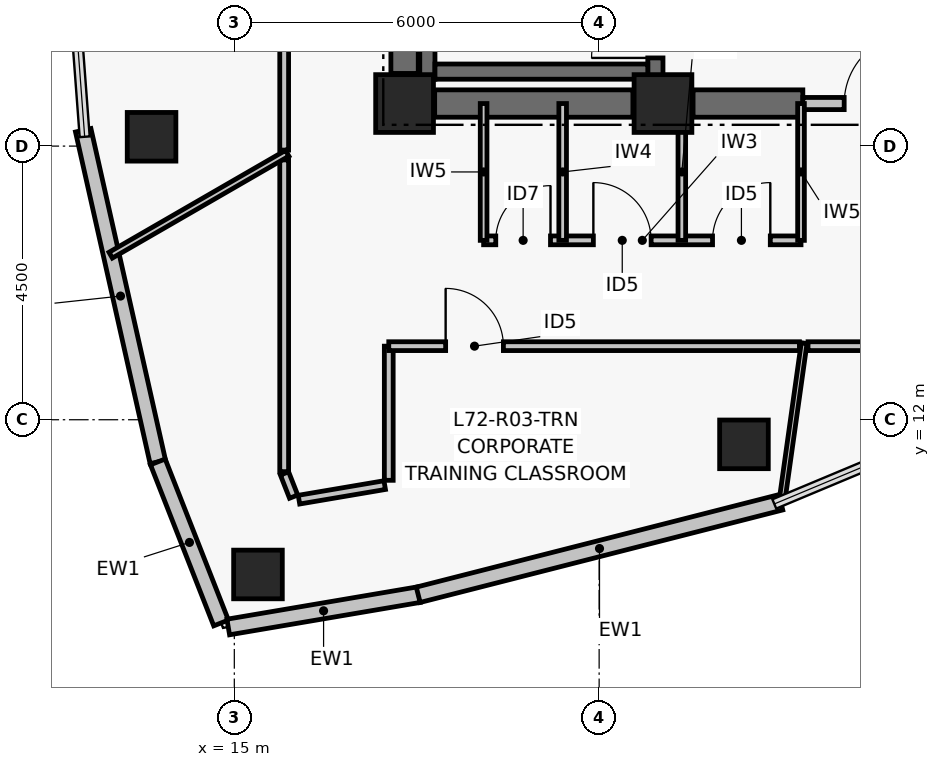
"""IFC4 building model, lengths in metres.
Left out: names, types, materials, properties, quantities, classifications, styles, units other than length and angle.
Written with IfcOpenShell. Run it as: python <this file> out.ifc"""

import sys

from ifc_helpers import new_model, si_unit, direction, frame, frame_2d, origin, origin_2d, place, context, subcontext, project, spatial, rectangle, hollow_rectangle, extrude, element, fill, save


model = new_model("IFC4")
c1 = context("Model", 3, precision=1e-05, world=origin(), true_north=direction((0.0, 1.0)))
c2 = subcontext(c1, "Body", "Model", "MODEL_VIEW")
j1 = project(units=[si_unit("LENGTHUNIT", "METRE"), si_unit("PLANEANGLEUNIT", "RADIAN")], contexts=[c1])
p1 = place(None, origin())
s1 = spatial("IfcSite", under=j1, at=p1, CompositionType="ELEMENT")
p2 = place(p1, origin())
s2 = spatial("IfcBuilding", under=s1, at=p2, CompositionType="ELEMENT")
p3 = place(p2, frame((0.0, 0.0, 284.34)))
s3 = spatial("IfcBuildingStorey", under=s2, at=p3, CompositionType="ELEMENT", Elevation=284.34)
for number, where, z_axis, x_axis in (
    (1, (17.8, 17.2, 0.0), (0.0, 0.0, 1.0), (1.0, 0.0, 0.0)),
    (2, (22.05, 17.2, 0.0), (0.0, 0.0, 1.0), (1.0, 0.0, 0.0)),
):
    element("IfcColumn", number, at=place(p3, frame(where, z_axis=z_axis, x_axis=x_axis)), inside=s3, PredefinedType="COLUMN", context=c2, shape_type="SweptSolid", body=[
        extrude(rectangle(XDim=0.95, YDim=0.95, at=origin_2d()), origin(), (0.0, 0.0, 1.0), 3.72),
    ])
p4 = place(p3, frame((18.295, 17.2, 0.0), z_axis=(0.0, 0.0, 1.0), x_axis=(1.0, 0.0, 0.0)))
e3 = element("IfcWall", 3, at=p4, inside=s3, PredefinedType="SHEAR", context=c2, shape_type="SweptSolid", body=[
    extrude(rectangle(XDim=3.26, YDim=0.45, at=frame_2d((1.63, 0.0))), origin(), (0.0, 0.0, 1.0), 3.5),
])
p5 = place(p3, frame((22.545, 17.2, 0.0), z_axis=(0.0, 0.0, 1.0), x_axis=(1.0, 0.0, 0.0)))
e4 = element("IfcWall", 4, at=p5, inside=s3, PredefinedType="SHEAR", context=c2, shape_type="SweptSolid", body=[
    extrude(rectangle(XDim=1.805, YDim=0.45, at=frame_2d((0.903, 0.0))), origin(), (0.0, 0.0, 1.0), 3.5),
])
p6 = place(p3, frame((17.8, 17.695, 0.0), z_axis=(0.0, 0.0, 1.0), x_axis=(0.0, 1.0, 0.0)))
e5 = element("IfcWall", 5, at=p6, inside=s3, PredefinedType="SHEAR", context=c2, shape_type="SweptSolid", body=[
    extrude(rectangle(XDim=8.61, YDim=0.45, at=frame_2d((4.305, 0.0))), origin(), (0.0, 0.0, 1.0), 3.5),
])
p7 = place(p3, frame((18.175, 17.6, 0.0), z_axis=(0.0, 0.0, 1.0), x_axis=(0.0, 1.0, 0.0)))
e6 = element("IfcWall", 6, at=p7, inside=s3, PredefinedType="SHEAR", context=c2, shape_type="SweptSolid", body=[
    extrude(rectangle(XDim=8.8, YDim=0.25, at=frame_2d((4.4, 0.0))), origin(), (0.0, 0.0, 1.0), 3.5),
])
p8 = place(p3, frame((21.925, 17.6, 0.0), z_axis=(0.0, 0.0, 1.0), x_axis=(0.0, 1.0, 0.0)))
e7 = element("IfcWall", 7, at=p8, inside=s3, PredefinedType="SHEAR", context=c2, shape_type="SweptSolid", body=[
    extrude(rectangle(XDim=8.8, YDim=0.25, at=frame_2d((4.4, 0.0))), origin(), (0.0, 0.0, 1.0), 3.5),
])
p9 = place(p8, frame((0.35, 0.0, 0.0)))
e8 = element("IfcOpeningElement", 8, at=p9, cuts=e7, PredefinedType="OPENING", context=c2, shape_type="SweptSolid", body=[
    extrude(rectangle(XDim=1.05, YDim=2.08, at=frame_2d((0.525, 1.04))), frame((0.0, 0.135, 0.0), z_axis=(0.0, -1.0, 0.0), x_axis=(1.0, 0.0, 0.0)), (0.0, 0.0, 1.0), 0.27),
])
p10 = place(p3, frame((18.3, 17.725, 0.0), z_axis=(0.0, 0.0, 1.0), x_axis=(1.0, 0.0, 0.0)))
e9 = element("IfcWall", 9, at=p10, inside=s3, PredefinedType="SHEAR", context=c2, shape_type="SweptSolid", body=[
    extrude(rectangle(XDim=3.5, YDim=0.25, at=frame_2d((1.75, 0.0))), origin(), (0.0, 0.0, 1.0), 3.5),
])
for number, where, z_axis, x_axis in (
    (10, (13.639, 16.653, 0.0), (0.0, 0.0, 1.0), (1.0, 0.0, 0.0)),
    (11, (15.389, 9.455, 0.0), (0.0, 0.0, 1.0), (1.0, 0.0, 0.0)),
    (12, (23.382, 11.595, 0.0), (0.0, 0.0, 1.0), (1.0, 0.0, 0.0)),
):
    element("IfcColumn", number, at=place(p3, frame(where, z_axis=z_axis, x_axis=x_axis)), inside=s3, PredefinedType="COLUMN", context=c2, shape_type="SweptSolid", body=[
        extrude(hollow_rectangle(XDim=0.8, YDim=0.8, WallThickness=0.035, at=origin_2d()), origin(), (0.0, 0.0, 1.0), 3.72),
    ])
p11 = place(p3, frame((13.742, 11.307, 0.0), z_axis=(0.0, 0.0, 1.0), x_axis=(-0.219500763731, 0.97561232809, 0.0)))
e13 = element("IfcWall", 13, at=p11, inside=s3, PredefinedType="PARTITIONING", context=c2, shape_type="SweptSolid", body=[
    extrude(rectangle(XDim=5.59, YDim=0.26, at=frame_2d((2.795, 0.0))), origin(), (0.0, 0.0, 1.0), 3.5),
])
p12 = place(p3, frame((14.782, 8.658, 0.0), z_axis=(0.0, 0.0, 1.0), x_axis=(-0.36559927932, 0.930772349697, 0.0)))
e14 = element("IfcWall", 14, at=p12, inside=s3, PredefinedType="PARTITIONING", context=c2, shape_type="SweptSolid", body=[
    extrude(rectangle(XDim=2.845, YDim=0.26, at=frame_2d((1.423, 0.0))), origin(), (0.0, 0.0, 1.0), 3.5),
])
p13 = place(p3, frame((18.036, 9.124, 0.0), z_axis=(0.0, 0.0, 1.0), x_axis=(-0.985889432766, -0.167397808709, 0.0)))
e15 = element("IfcWall", 15, at=p13, inside=s3, PredefinedType="PARTITIONING", context=c2, shape_type="SweptSolid", body=[
    extrude(rectangle(XDim=3.181, YDim=0.26, at=frame_2d((1.59, 0.0))), origin(), (0.0, 0.0, 1.0), 3.5),
])
p14 = place(p3, frame((23.988, 10.642, 0.0), z_axis=(0.0, 0.0, 1.0), x_axis=(-0.968988278672, -0.247106689096, 0.0)))
e16 = element("IfcWall", 16, at=p14, inside=s3, PredefinedType="PARTITIONING", context=c2, shape_type="SweptSolid", body=[
    extrude(rectangle(XDim=6.154, YDim=0.26, at=frame_2d((3.077, 0.0))), origin(), (0.0, 0.0, 1.0), 3.5),
])
p15 = place(p3, frame((24.35, 17.2, 0.0), z_axis=(0.0, 0.0, 1.0), x_axis=(1.0, 0.0, 0.0)))
e17 = element("IfcWall", 17, at=p15, inside=s3, PredefinedType="PARTITIONING", context=c2, shape_type="SweptSolid", body=[
    extrude(rectangle(XDim=2.5, YDim=0.2, at=frame_2d((1.25, 0.0))), origin(), (0.0, 0.0, 1.0), 2.63),
])
p16 = place(p15, frame((0.68, 0.0, 0.0)))
e18 = element("IfcOpeningElement", 18, at=p16, cuts=e17, PredefinedType="OPENING", context=c2, shape_type="SweptSolid", body=[
    extrude(rectangle(XDim=1.15, YDim=2.08, at=frame_2d((0.575, 1.04))), frame((0.0, 0.11, 0.0), z_axis=(0.0, -1.0, 0.0), x_axis=(1.0, 0.0, 0.0)), (0.0, 0.0, 1.0), 0.22),
])
p17 = place(p3, frame((19.1, 14.95, 0.0), z_axis=(0.0, 0.0, 1.0), x_axis=(1.0, 0.0, 0.0)))
e19 = element("IfcWall", 19, at=p17, inside=s3, PredefinedType="PARTITIONING", context=c2, shape_type="SweptSolid", body=[
    extrude(rectangle(XDim=5.22, YDim=0.145, at=frame_2d((2.61, 0.0))), origin(), (0.0, 0.0, 1.0), 2.83),
])
p18 = place(p17, frame((0.2, 0.0, 0.0)))
e20 = element("IfcOpeningElement", 20, at=p18, cuts=e19, PredefinedType="OPENING", context=c2, shape_type="SweptSolid", body=[
    extrude(rectangle(XDim=0.9, YDim=2.02, at=frame_2d((0.45, 1.01))), frame((0.0, 0.083, 0.0), z_axis=(0.0, -1.0, 0.0), x_axis=(1.0, 0.0, 0.0)), (0.0, 0.0, 1.0), 0.165),
])
p19 = place(p17, frame((1.805, 0.0, 0.0)))
e21 = element("IfcOpeningElement", 21, at=p19, cuts=e19, PredefinedType="OPENING", context=c2, shape_type="SweptSolid", body=[
    extrude(rectangle(XDim=0.95, YDim=2.06, at=frame_2d((0.475, 1.03))), frame((0.0, 0.083, 0.0), z_axis=(0.0, -1.0, 0.0), x_axis=(1.0, 0.0, 0.0)), (0.0, 0.0, 1.0), 0.165),
])
p20 = place(p17, frame((3.765, 0.0, 0.0)))
e22 = element("IfcOpeningElement", 22, at=p20, cuts=e19, PredefinedType="OPENING", context=c2, shape_type="SweptSolid", body=[
    extrude(rectangle(XDim=0.95, YDim=2.06, at=frame_2d((0.475, 1.03))), frame((0.0, 0.083, 0.0), z_axis=(0.0, -1.0, 0.0), x_axis=(1.0, 0.0, 0.0)), (0.0, 0.0, 1.0), 0.165),
])
p21 = place(p3, frame((19.1, 14.95, 0.0), z_axis=(0.0, 0.0, 1.0), x_axis=(0.0, 1.0, 0.0)))
e23 = element("IfcWall", 23, at=p21, inside=s3, PredefinedType="PARTITIONING", context=c2, shape_type="SweptSolid", body=[
    extrude(rectangle(XDim=2.25, YDim=0.11, at=frame_2d((1.125, 0.0))), origin(), (0.0, 0.0, 1.0), 2.63),
])
for number, where, z_axis, x_axis in (
    (24, (20.4, 14.95, 0.0), (0.0, 0.0, 1.0), (0.0, 1.0, 0.0)),
    (25, (22.36, 14.95, 0.0), (0.0, 0.0, 1.0), (0.0, 1.0, 0.0)),
):
    element("IfcWall", number, at=place(p3, frame(where, z_axis=z_axis, x_axis=x_axis)), inside=s3, PredefinedType="PARTITIONING", context=c2, shape_type="SweptSolid", body=[
        extrude(rectangle(XDim=2.25, YDim=0.125, at=frame_2d((1.125, 0.0))), origin(), (0.0, 0.0, 1.0), 2.63),
    ])
p22 = place(p3, frame((24.32, 14.95, 0.0), z_axis=(0.0, 0.0, 1.0), x_axis=(0.0, 1.0, 0.0)))
e26 = element("IfcWall", 26, at=p22, inside=s3, PredefinedType="PARTITIONING", context=c2, shape_type="SweptSolid", body=[
    extrude(rectangle(XDim=2.25, YDim=0.11, at=frame_2d((1.125, 0.0))), origin(), (0.0, 0.0, 1.0), 2.63),
])
p23 = place(p3, frame((15.82, 25.876, 0.0), z_axis=(0.0, 0.0, 1.0), x_axis=(0.0, -1.0, 0.0)))
e27 = element("IfcWall", 27, at=p23, inside=s3, PredefinedType="PARTITIONING", context=c2, shape_type="SweptSolid", body=[
    extrude(rectangle(XDim=9.442, YDim=0.145, at=frame_2d((4.721, 0.0))), origin(), (0.0, 0.0, 1.0), 2.83),
])
p24 = place(p23, frame((3.254, 0.0, 0.0)))
e28 = element("IfcOpeningElement", 28, at=p24, cuts=e27, PredefinedType="OPENING", context=c2, shape_type="SweptSolid", body=[
    extrude(rectangle(XDim=0.95, YDim=2.06, at=frame_2d((0.475, 1.03))), frame((0.0, 0.083, 0.0), z_axis=(0.0, -1.0, 0.0), x_axis=(1.0, 0.0, 0.0)), (0.0, 0.0, 1.0), 0.165),
])
p25 = place(p3, frame((15.82, 16.273, 0.0), z_axis=(0.0, 0.0, 1.0), x_axis=(0.0, -1.0, 0.0)))
e29 = element("IfcWall", 29, at=p25, inside=s3, PredefinedType="PARTITIONING", context=c2, shape_type="SweptSolid", body=[
    extrude(rectangle(XDim=5.126, YDim=0.145, at=frame_2d((2.563, 0.0))), origin(), (0.0, 0.0, 1.0), 2.83),
])
p26 = place(p3, frame((15.825, 11.117, 0.0), z_axis=(0.0, 0.0, 1.0), x_axis=(0.365633948196, -0.930758731319, 0.0)))
e30 = element("IfcWall", 30, at=p26, inside=s3, PredefinedType="PARTITIONING", context=c2, shape_type="SweptSolid", body=[
    extrude(rectangle(XDim=0.41, YDim=0.145, at=frame_2d((0.205, 0.0))), origin(), (0.0, 0.0, 1.0), 2.83),
])
p27 = place(p3, frame((16.063, 10.686, 0.0), z_axis=(0.0, 0.0, 1.0), x_axis=(0.985881780308, 0.167442871621, 0.0)))
e31 = element("IfcWall", 31, at=p27, inside=s3, PredefinedType="PARTITIONING", context=c2, shape_type="SweptSolid", body=[
    extrude(rectangle(XDim=1.43, YDim=0.145, at=frame_2d((0.715, 0.0))), origin(), (0.0, 0.0, 1.0), 3.13),
])
p28 = place(p3, frame((17.54, 11.004, 0.0), z_axis=(0.0, 0.0, 1.0), x_axis=(0.0, 1.0, 0.0)))
e32 = element("IfcWall", 32, at=p28, inside=s3, PredefinedType="PARTITIONING", context=c2, shape_type="SweptSolid", body=[
    extrude(rectangle(XDim=2.206, YDim=0.145, at=frame_2d((1.103, 0.0))), origin(), (0.0, 0.0, 1.0), 3.13),
])
p29 = place(p3, frame((17.54, 13.21, 0.0), z_axis=(0.0, 0.0, 1.0), x_axis=(1.0, 0.0, 0.0)))
e33 = element("IfcWall", 33, at=p29, inside=s3, PredefinedType="PARTITIONING", context=c2, shape_type="SweptSolid", body=[
    extrude(rectangle(XDim=6.754, YDim=0.145, at=frame_2d((3.377, 0.0))), origin(), (0.0, 0.0, 1.0), 2.83),
])
p30 = place(p29, frame((0.936, 0.0, 0.0)))
e34 = element("IfcOpeningElement", 34, at=p30, cuts=e33, PredefinedType="OPENING", context=c2, shape_type="SweptSolid", body=[
    extrude(rectangle(XDim=0.95, YDim=2.06, at=frame_2d((0.475, 1.03))), frame((0.0, 0.083, 0.0), z_axis=(0.0, -1.0, 0.0), x_axis=(1.0, 0.0, 0.0)), (0.0, 0.0, 1.0), 0.165),
])
p31 = place(p3, frame((24.435, 13.21, 0.0), z_axis=(0.0, 0.0, 1.0), x_axis=(1.0, 0.0, 0.0)))
e35 = element("IfcWall", 35, at=p31, inside=s3, PredefinedType="PARTITIONING", context=c2, shape_type="SweptSolid", body=[
    extrude(rectangle(XDim=4.675, YDim=0.145, at=frame_2d((2.337, 0.0))), origin(), (0.0, 0.0, 1.0), 2.98),
])
p32 = place(p31, frame((2.676, 0.0, 0.0)))
e36 = element("IfcOpeningElement", 36, at=p32, cuts=e35, PredefinedType="OPENING", context=c2, shape_type="SweptSolid", body=[
    extrude(rectangle(XDim=0.92, YDim=2.05, at=frame_2d((0.46, 1.025))), frame((0.0, 0.083, 0.0), z_axis=(0.0, -1.0, 0.0), x_axis=(1.0, 0.0, 0.0)), (0.0, 0.0, 1.0), 0.165),
])
p33 = place(p3, frame((15.87, 16.382, 0.0), z_axis=(0.0, 0.0, 1.0), x_axis=(-0.866052188221, -0.499953605124, 0.0)))
e37 = element("IfcWall", 37, at=p33, inside=s3, PredefinedType="PARTITIONING", context=c2, shape_type="SweptSolid", body=[
    extrude(rectangle(XDim=3.352, YDim=0.11, at=frame_2d((1.676, 0.0))), origin(), (0.0, 0.0, 1.0), 2.98),
])
p34 = place(p3, frame((24.372, 13.26, 0.0), z_axis=(0.0, 0.0, 1.0), x_axis=(-0.139185119823, -0.990266379526, 0.0)))
e38 = element("IfcWall", 38, at=p34, inside=s3, PredefinedType="PARTITIONING", context=c2, shape_type="SweptSolid", body=[
    extrude(rectangle(XDim=2.629, YDim=0.095, at=frame_2d((1.315, 0.0))), origin(), (0.0, 0.0, 1.0), 2.98),
])
p35 = place(p9, origin())
e39 = element("IfcDoor", 39, at=p35, inside=s3, OperationType="SINGLE_SWING_LEFT", PredefinedType="DOOR", context=c2, shape_type="SweptSolid", body=[
    extrude(rectangle(XDim=1.05, YDim=2.08, at=frame_2d((0.525, 1.04))), frame((0.0, 0.025, 0.0), z_axis=(0.0, -1.0, 0.0), x_axis=(1.0, 0.0, 0.0)), (0.0, 0.0, 1.0), 0.05),
])
fill(e8, e39)
p36 = place(p16, origin())
e40 = element("IfcDoor", 40, at=p36, inside=s3, OperationType="SINGLE_SWING_RIGHT", PredefinedType="DOOR", context=c2, shape_type="SweptSolid", body=[
    extrude(rectangle(XDim=1.15, YDim=2.08, at=frame_2d((0.575, 1.04))), frame((0.0, 0.025, 0.0), z_axis=(0.0, -1.0, 0.0), x_axis=(1.0, 0.0, 0.0)), (0.0, 0.0, 1.0), 0.05),
])
fill(e18, e40)
p37 = place(p18, origin())
e41 = element("IfcDoor", 41, at=p37, inside=s3, OperationType="SINGLE_SWING_RIGHT", PredefinedType="DOOR", context=c2, shape_type="SweptSolid", body=[
    extrude(rectangle(XDim=0.9, YDim=2.02, at=frame_2d((0.45, 1.01))), frame((0.0, 0.025, 0.0), z_axis=(0.0, -1.0, 0.0), x_axis=(1.0, 0.0, 0.0)), (0.0, 0.0, 1.0), 0.05),
])
fill(e20, e41)
p38 = place(p19, origin())
e42 = element("IfcDoor", 42, at=p38, inside=s3, OperationType="SINGLE_SWING_LEFT", PredefinedType="DOOR", context=c2, shape_type="SweptSolid", body=[
    extrude(rectangle(XDim=0.95, YDim=2.06, at=frame_2d((0.475, 1.03))), frame((0.0, 0.025, 0.0), z_axis=(0.0, -1.0, 0.0), x_axis=(1.0, 0.0, 0.0)), (0.0, 0.0, 1.0), 0.05),
])
fill(e21, e42)
p39 = place(p20, origin())
e43 = element("IfcDoor", 43, at=p39, inside=s3, OperationType="SINGLE_SWING_RIGHT", PredefinedType="DOOR", context=c2, shape_type="SweptSolid", body=[
    extrude(rectangle(XDim=0.95, YDim=2.06, at=frame_2d((0.475, 1.03))), frame((0.0, 0.025, 0.0), z_axis=(0.0, -1.0, 0.0), x_axis=(1.0, 0.0, 0.0)), (0.0, 0.0, 1.0), 0.05),
])
fill(e22, e43)
p40 = place(p30, origin())
e44 = element("IfcDoor", 44, at=p40, inside=s3, OperationType="SINGLE_SWING_LEFT", PredefinedType="DOOR", context=c2, shape_type="SweptSolid", body=[
    extrude(rectangle(XDim=0.95, YDim=2.06, at=frame_2d((0.475, 1.03))), frame((0.0, 0.025, 0.0), z_axis=(0.0, -1.0, 0.0), x_axis=(1.0, 0.0, 0.0)), (0.0, 0.0, 1.0), 0.05),
])
fill(e34, e44)
save(model, sys.argv[1])
